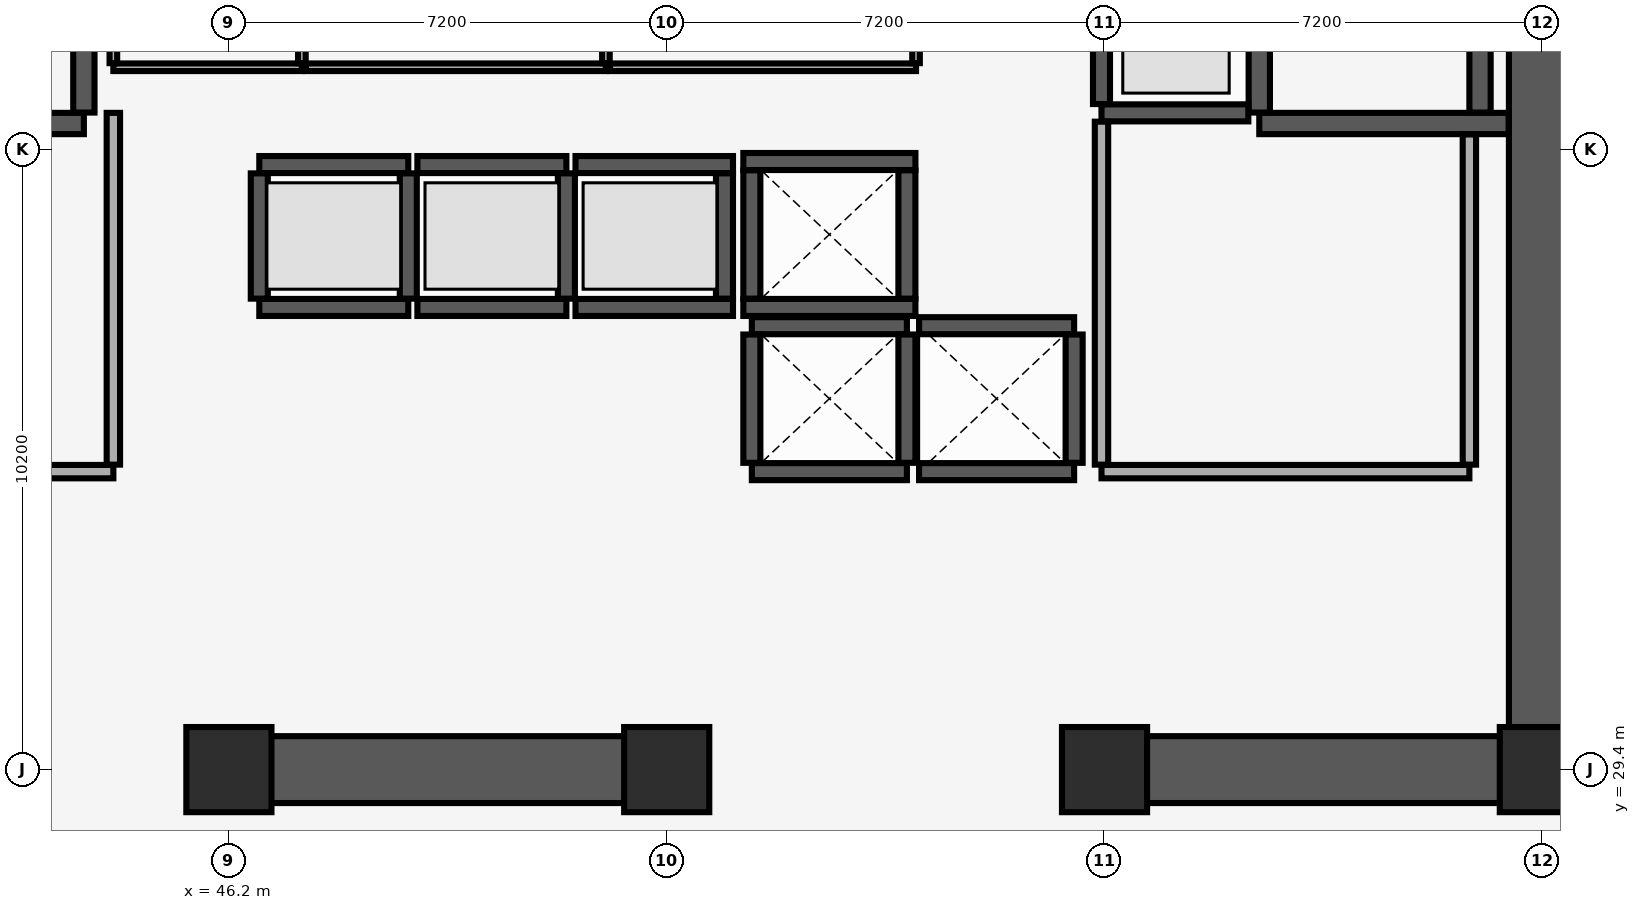
"""IFC4 building model, lengths in metres.
Left out: names, types, materials, properties, quantities, classifications, styles, units other than length and angle.
Written with IfcOpenShell. Run it as: python <this file> out.ifc"""

import sys

from ifc_helpers import new_model, si_unit, direction, frame, frame_2d, origin, origin_2d, place, context, subcontext, project, spatial, rectangle, extrude, element, fill, save


model = new_model("IFC4")
c1 = context("Model", 3, precision=1e-05, world=origin(), true_north=direction((0.0, 1.0)))
c2 = subcontext(c1, "Body", "Model", "MODEL_VIEW")
j1 = project(units=[si_unit("LENGTHUNIT", "METRE"), si_unit("PLANEANGLEUNIT", "RADIAN")], contexts=[c1])
p1 = place(None, origin())
s1 = spatial("IfcSite", under=j1, at=p1, CompositionType="ELEMENT")
p2 = place(p1, origin())
s2 = spatial("IfcBuilding", under=s1, at=p2, CompositionType="ELEMENT")
p3 = place(p2, frame((0.0, 0.0, 8.0)))
s3 = spatial("IfcBuildingStorey", under=s2, at=p3, CompositionType="ELEMENT", Elevation=8.0)
for number, where, z_axis, x_axis in (
    (1, (46.2, 29.4, 0.0), (0.0, 0.0, 1.0), (1.0, 0.0, 0.0)),
    (2, (53.4, 29.4, 0.0), (0.0, 0.0, 1.0), (1.0, 0.0, 0.0)),
    (3, (60.6, 29.4, 0.0), (0.0, 0.0, 1.0), (1.0, 0.0, 0.0)),
    (4, (67.8, 29.4, 0.0), (0.0, 0.0, 1.0), (1.0, 0.0, 0.0)),
):
    element("IfcColumn", number, at=place(p3, frame(where, z_axis=z_axis, x_axis=x_axis)), inside=s3, PredefinedType="COLUMN", context=c2, shape_type="SweptSolid", body=[
        extrude(rectangle(XDim=1.4, YDim=1.4, at=origin_2d()), origin(), (0.0, 0.0, 1.0), 5.68),
    ])
p4 = place(p3, frame((67.8, 29.4, 0.0), z_axis=(0.0, 0.0, 1.0), x_axis=(0.0, 1.0, 0.0)))
e5 = element("IfcWall", 5, at=p4, inside=s3, PredefinedType="SHEAR", context=c2, shape_type="SweptSolid", body=[
    extrude(rectangle(XDim=19.2, YDim=1.1, at=frame_2d((9.6, 0.0))), origin(), (0.0, 0.0, 1.0), 5.68),
])
p5 = place(p3, frame((46.0, 29.4, 0.0), z_axis=(0.0, 0.0, 1.0), x_axis=(1.0, 0.0, 0.0)))
e6 = element("IfcWall", 6, at=p5, inside=s3, PredefinedType="SHEAR", context=c2, shape_type="SweptSolid", body=[
    extrude(rectangle(XDim=7.6, YDim=1.1, at=frame_2d((3.8, 0.0))), origin(), (0.0, 0.0, 1.0), 5.68),
])
p6 = place(p3, frame((60.4, 29.4, 0.0), z_axis=(0.0, 0.0, 1.0), x_axis=(1.0, 0.0, 0.0)))
e7 = element("IfcWall", 7, at=p6, inside=s3, PredefinedType="SHEAR", context=c2, shape_type="SweptSolid", body=[
    extrude(rectangle(XDim=6.845, YDim=1.1, at=frame_2d((3.423, 0.0))), origin(), (0.0, 0.0, 1.0), 5.68),
])
p7 = place(p3, frame((40.185, 40.025, 0.0), z_axis=(0.0, 0.0, 1.0), x_axis=(1.0, 0.0, 0.0)))
e8 = element("IfcWall", 8, at=p7, inside=s3, PredefinedType="SHEAR", context=c2, shape_type="SweptSolid", body=[
    extrude(rectangle(XDim=3.63, YDim=0.35, at=frame_2d((1.815, 0.0))), origin(), (0.0, 0.0, 1.0), 5.68),
])
p8 = place(p7, frame((1.24, 0.0, 0.0)))
e9 = element("IfcOpeningElement", 9, at=p8, cuts=e8, PredefinedType="OPENING", context=c2, shape_type="SweptSolid", body=[
    extrude(rectangle(XDim=1.15, YDim=2.15, at=frame_2d((0.575, 1.075))), frame((0.0, 0.185, 0.0), z_axis=(0.0, -1.0, 0.0), x_axis=(1.0, 0.0, 0.0)), (0.0, 0.0, 1.0), 0.37),
])
p9 = place(p3, frame((43.815, 40.205, 0.0), z_axis=(0.0, 0.0, 1.0), x_axis=(0.0, 1.0, 0.0)))
e10 = element("IfcWall", 10, at=p9, inside=s3, PredefinedType="SHEAR", context=c2, shape_type="SweptSolid", body=[
    extrude(rectangle(XDim=8.09, YDim=0.35, at=frame_2d((4.045, 0.0))), origin(), (0.0, 0.0, 1.0), 5.68),
])
p10 = place(p3, frame((63.145, 40.025, 0.0), z_axis=(0.0, 0.0, 1.0), x_axis=(1.0, 0.0, 0.0)))
e11 = element("IfcWall", 11, at=p10, inside=s3, PredefinedType="SHEAR", context=c2, shape_type="SweptSolid", body=[
    extrude(rectangle(XDim=4.1, YDim=0.35, at=frame_2d((2.05, 0.0))), origin(), (0.0, 0.0, 1.0), 5.68),
])
p11 = place(p10, frame((1.24, 0.0, 0.0)))
e12 = element("IfcOpeningElement", 12, at=p11, cuts=e11, PredefinedType="OPENING", context=c2, shape_type="SweptSolid", body=[
    extrude(rectangle(XDim=1.15, YDim=2.15, at=frame_2d((0.575, 1.075))), frame((0.0, 0.185, 0.0), z_axis=(0.0, -1.0, 0.0), x_axis=(1.0, 0.0, 0.0)), (0.0, 0.0, 1.0), 0.37),
])
for number, where, z_axis, x_axis in (
    (13, (63.145, 40.205, 0.0), (0.0, 0.0, 1.0), (0.0, 1.0, 0.0)),
    (14, (66.775, 40.205, 0.0), (0.0, 0.0, 1.0), (0.0, 1.0, 0.0)),
):
    element("IfcWall", number, at=place(p3, frame(where, z_axis=z_axis, x_axis=x_axis)), inside=s3, PredefinedType="SHEAR", context=c2, shape_type="SweptSolid", body=[
        extrude(rectangle(XDim=8.09, YDim=0.35, at=frame_2d((4.045, 0.0))), origin(), (0.0, 0.0, 1.0), 5.68),
    ])
p12 = place(p3, frame((46.7, 37.0, 0.0), z_axis=(0.0, 0.0, 1.0), x_axis=(1.0, 0.0, 0.0)))
e15 = element("IfcWall", 15, at=p12, inside=s3, PredefinedType="SHEAR", context=c2, shape_type="SweptSolid", body=[
    extrude(rectangle(XDim=2.45, YDim=0.28, at=frame_2d((1.225, 0.0))), origin(), (0.0, 0.0, 1.0), 5.68),
])
p13 = place(p3, frame((46.7, 39.35, 0.0), z_axis=(0.0, 0.0, 1.0), x_axis=(1.0, 0.0, 0.0)))
e16 = element("IfcWall", 16, at=p13, inside=s3, PredefinedType="SHEAR", context=c2, shape_type="SweptSolid", body=[
    extrude(rectangle(XDim=2.45, YDim=0.28, at=frame_2d((1.225, 0.0))), origin(), (0.0, 0.0, 1.0), 5.68),
])
p14 = place(p13, frame((0.625, 0.0, 0.0)))
e17 = element("IfcOpeningElement", 17, at=p14, cuts=e16, PredefinedType="OPENING", context=c2, shape_type="SweptSolid", body=[
    extrude(rectangle(XDim=1.2, YDim=2.25, at=frame_2d((0.6, 1.125))), frame((0.0, 0.15, 0.0), z_axis=(0.0, -1.0, 0.0), x_axis=(1.0, 0.0, 0.0)), (0.0, 0.0, 1.0), 0.3),
])
for number, where, z_axis, x_axis in (
    (18, (46.7, 37.145, 0.0), (0.0, 0.0, 1.0), (0.0, 1.0, 0.0)),
    (19, (49.15, 37.145, 0.0), (0.0, 0.0, 1.0), (0.0, 1.0, 0.0)),
):
    element("IfcWall", number, at=place(p3, frame(where, z_axis=z_axis, x_axis=x_axis)), inside=s3, PredefinedType="SHEAR", context=c2, shape_type="SweptSolid", body=[
        extrude(rectangle(XDim=2.06, YDim=0.28, at=frame_2d((1.03, 0.0))), origin(), (0.0, 0.0, 1.0), 5.68),
    ])
p15 = place(p3, frame((49.3, 37.0, 0.0), z_axis=(0.0, 0.0, 1.0), x_axis=(1.0, 0.0, 0.0)))
e20 = element("IfcWall", 20, at=p15, inside=s3, PredefinedType="SHEAR", context=c2, shape_type="SweptSolid", body=[
    extrude(rectangle(XDim=2.45, YDim=0.28, at=frame_2d((1.225, 0.0))), origin(), (0.0, 0.0, 1.0), 5.68),
])
p16 = place(p3, frame((49.3, 39.35, 0.0), z_axis=(0.0, 0.0, 1.0), x_axis=(1.0, 0.0, 0.0)))
e21 = element("IfcWall", 21, at=p16, inside=s3, PredefinedType="SHEAR", context=c2, shape_type="SweptSolid", body=[
    extrude(rectangle(XDim=2.45, YDim=0.28, at=frame_2d((1.225, 0.0))), origin(), (0.0, 0.0, 1.0), 5.68),
])
p17 = place(p16, frame((0.625, 0.0, 0.0)))
e22 = element("IfcOpeningElement", 22, at=p17, cuts=e21, PredefinedType="OPENING", context=c2, shape_type="SweptSolid", body=[
    extrude(rectangle(XDim=1.2, YDim=2.25, at=frame_2d((0.6, 1.125))), frame((0.0, 0.15, 0.0), z_axis=(0.0, -1.0, 0.0), x_axis=(1.0, 0.0, 0.0)), (0.0, 0.0, 1.0), 0.3),
])
p18 = place(p3, frame((51.75, 37.145, 0.0), z_axis=(0.0, 0.0, 1.0), x_axis=(0.0, 1.0, 0.0)))
e23 = element("IfcWall", 23, at=p18, inside=s3, PredefinedType="SHEAR", context=c2, shape_type="SweptSolid", body=[
    extrude(rectangle(XDim=2.06, YDim=0.28, at=frame_2d((1.03, 0.0))), origin(), (0.0, 0.0, 1.0), 5.68),
])
p19 = place(p3, frame((51.9, 37.0, 0.0), z_axis=(0.0, 0.0, 1.0), x_axis=(1.0, 0.0, 0.0)))
e24 = element("IfcWall", 24, at=p19, inside=s3, PredefinedType="SHEAR", context=c2, shape_type="SweptSolid", body=[
    extrude(rectangle(XDim=2.59, YDim=0.28, at=frame_2d((1.295, 0.0))), origin(), (0.0, 0.0, 1.0), 5.68),
])
p20 = place(p3, frame((51.9, 39.35, 0.0), z_axis=(0.0, 0.0, 1.0), x_axis=(1.0, 0.0, 0.0)))
e25 = element("IfcWall", 25, at=p20, inside=s3, PredefinedType="SHEAR", context=c2, shape_type="SweptSolid", body=[
    extrude(rectangle(XDim=2.59, YDim=0.28, at=frame_2d((1.295, 0.0))), origin(), (0.0, 0.0, 1.0), 5.68),
])
p21 = place(p20, frame((0.625, 0.0, 0.0)))
e26 = element("IfcOpeningElement", 26, at=p21, cuts=e25, PredefinedType="OPENING", context=c2, shape_type="SweptSolid", body=[
    extrude(rectangle(XDim=1.2, YDim=2.25, at=frame_2d((0.6, 1.125))), frame((0.0, 0.15, 0.0), z_axis=(0.0, -1.0, 0.0), x_axis=(1.0, 0.0, 0.0)), (0.0, 0.0, 1.0), 0.3),
])
p22 = place(p3, frame((54.35, 37.145, 0.0), z_axis=(0.0, 0.0, 1.0), x_axis=(0.0, 1.0, 0.0)))
e27 = element("IfcWall", 27, at=p22, inside=s3, PredefinedType="SHEAR", context=c2, shape_type="SweptSolid", body=[
    extrude(rectangle(XDim=2.06, YDim=0.28, at=frame_2d((1.03, 0.0))), origin(), (0.0, 0.0, 1.0), 5.68),
])
for number, where, z_axis, x_axis in (
    (28, (54.8, 34.3, 0.0), (0.0, 0.0, 1.0), (1.0, 0.0, 0.0)),
    (29, (54.8, 36.7, 0.0), (0.0, 0.0, 1.0), (1.0, 0.0, 0.0)),
):
    element("IfcWall", number, at=place(p3, frame(where, z_axis=z_axis, x_axis=x_axis)), inside=s3, PredefinedType="SHEAR", context=c2, shape_type="SweptSolid", body=[
        extrude(rectangle(XDim=2.55, YDim=0.28, at=frame_2d((1.275, 0.0))), origin(), (0.0, 0.0, 1.0), 5.68),
    ])
for number, where, z_axis, x_axis in (
    (30, (54.8, 34.445, 0.0), (0.0, 0.0, 1.0), (0.0, 1.0, 0.0)),
    (31, (57.35, 34.445, 0.0), (0.0, 0.0, 1.0), (0.0, 1.0, 0.0)),
):
    element("IfcWall", number, at=place(p3, frame(where, z_axis=z_axis, x_axis=x_axis)), inside=s3, PredefinedType="SHEAR", context=c2, shape_type="SweptSolid", body=[
        extrude(rectangle(XDim=2.11, YDim=0.28, at=frame_2d((1.055, 0.0))), origin(), (0.0, 0.0, 1.0), 5.68),
    ])
for number, where, z_axis, x_axis in (
    (32, (57.55, 34.3, 0.0), (0.0, 0.0, 1.0), (1.0, 0.0, 0.0)),
    (33, (57.55, 36.7, 0.0), (0.0, 0.0, 1.0), (1.0, 0.0, 0.0)),
):
    element("IfcWall", number, at=place(p3, frame(where, z_axis=z_axis, x_axis=x_axis)), inside=s3, PredefinedType="SHEAR", context=c2, shape_type="SweptSolid", body=[
        extrude(rectangle(XDim=2.55, YDim=0.28, at=frame_2d((1.275, 0.0))), origin(), (0.0, 0.0, 1.0), 5.68),
    ])
p23 = place(p3, frame((60.1, 34.445, 0.0), z_axis=(0.0, 0.0, 1.0), x_axis=(0.0, 1.0, 0.0)))
e34 = element("IfcWall", 34, at=p23, inside=s3, PredefinedType="SHEAR", context=c2, shape_type="SweptSolid", body=[
    extrude(rectangle(XDim=2.11, YDim=0.28, at=frame_2d((1.055, 0.0))), origin(), (0.0, 0.0, 1.0), 5.68),
])
for number, where, z_axis, x_axis in (
    (35, (54.66, 37.0, 0.0), (0.0, 0.0, 1.0), (1.0, 0.0, 0.0)),
    (36, (54.66, 39.4, 0.0), (0.0, 0.0, 1.0), (1.0, 0.0, 0.0)),
):
    element("IfcWall", number, at=place(p3, frame(where, z_axis=z_axis, x_axis=x_axis)), inside=s3, PredefinedType="SHEAR", context=c2, shape_type="SweptSolid", body=[
        extrude(rectangle(XDim=2.83, YDim=0.28, at=frame_2d((1.415, 0.0))), origin(), (0.0, 0.0, 1.0), 5.68),
    ])
for number, where, z_axis, x_axis in (
    (37, (54.8, 37.145, 0.0), (0.0, 0.0, 1.0), (0.0, 1.0, 0.0)),
    (38, (57.35, 37.145, 0.0), (0.0, 0.0, 1.0), (0.0, 1.0, 0.0)),
):
    element("IfcWall", number, at=place(p3, frame(where, z_axis=z_axis, x_axis=x_axis)), inside=s3, PredefinedType="SHEAR", context=c2, shape_type="SweptSolid", body=[
        extrude(rectangle(XDim=2.11, YDim=0.28, at=frame_2d((1.055, 0.0))), origin(), (0.0, 0.0, 1.0), 5.68),
    ])
p24 = place(p3, frame((60.55, 40.2, 0.0), z_axis=(0.0, 0.0, 1.0), x_axis=(1.0, 0.0, 0.0)))
e39 = element("IfcWall", 39, at=p24, inside=s3, PredefinedType="SHEAR", context=c2, shape_type="SweptSolid", body=[
    extrude(rectangle(XDim=2.415, YDim=0.28, at=frame_2d((1.208, 0.0))), origin(), (0.0, 0.0, 1.0), 5.68),
])
p25 = place(p24, frame((0.575, 0.0, 0.0)))
e40 = element("IfcOpeningElement", 40, at=p25, cuts=e39, PredefinedType="OPENING", context=c2, shape_type="SweptSolid", body=[
    extrude(rectangle(XDim=1.3, YDim=2.3, at=frame_2d((0.65, 1.15))), frame((0.0, 0.15, 0.0), z_axis=(0.0, -1.0, 0.0), x_axis=(1.0, 0.0, 0.0)), (0.0, 0.0, 1.0), 0.3),
])
p26 = place(p3, frame((60.55, 40.345, 0.0), z_axis=(0.0, 0.0, 1.0), x_axis=(0.0, 1.0, 0.0)))
e41 = element("IfcWall", 41, at=p26, inside=s3, PredefinedType="SHEAR", context=c2, shape_type="SweptSolid", body=[
    extrude(rectangle(XDim=2.81, YDim=0.28, at=frame_2d((1.405, 0.0))), origin(), (0.0, 0.0, 1.0), 5.68),
])
p27 = place(p3, frame((60.55, 34.3, 0.0), z_axis=(0.0, 0.0, 1.0), x_axis=(1.0, 0.0, 0.0)))
e42 = element("IfcWall", 42, at=p27, inside=s3, PredefinedType="PARTITIONING", context=c2, shape_type="SweptSolid", body=[
    extrude(rectangle(XDim=6.05, YDim=0.22, at=frame_2d((3.025, 0.0))), origin(), (0.0, 0.0, 1.0), 5.68),
])
p28 = place(p27, frame((2.65, 0.0, 0.0)))
e43 = element("IfcOpeningElement", 43, at=p28, cuts=e42, PredefinedType="OPENING", context=c2, shape_type="SweptSolid", body=[
    extrude(rectangle(XDim=1.2, YDim=2.15, at=frame_2d((0.6, 1.075))), frame((0.0, 0.12, 0.0), z_axis=(0.0, -1.0, 0.0), x_axis=(1.0, 0.0, 0.0)), (0.0, 0.0, 1.0), 0.24),
])
p29 = place(p3, frame((60.55, 34.415, 0.0), z_axis=(0.0, 0.0, 1.0), x_axis=(0.0, 1.0, 0.0)))
e44 = element("IfcWall", 44, at=p29, inside=s3, PredefinedType="PARTITIONING", context=c2, shape_type="SweptSolid", body=[
    extrude(rectangle(XDim=5.64, YDim=0.22, at=frame_2d((2.82, 0.0))), origin(), (0.0, 0.0, 1.0), 5.68),
])
p30 = place(p3, frame((66.6, 34.415, 0.0), z_axis=(0.0, 0.0, 1.0), x_axis=(0.0, 1.0, 0.0)))
e45 = element("IfcWall", 45, at=p30, inside=s3, PredefinedType="PARTITIONING", context=c2, shape_type="SweptSolid", body=[
    extrude(rectangle(XDim=5.43, YDim=0.22, at=frame_2d((2.715, 0.0))), origin(), (0.0, 0.0, 1.0), 5.68),
])
p31 = place(p3, frame((39.7, 34.3, 0.0), z_axis=(0.0, 0.0, 1.0), x_axis=(1.0, 0.0, 0.0)))
e46 = element("IfcWall", 46, at=p31, inside=s3, PredefinedType="PARTITIONING", context=c2, shape_type="SweptSolid", body=[
    extrude(rectangle(XDim=4.6, YDim=0.22, at=frame_2d((2.3, 0.0))), origin(), (0.0, 0.0, 1.0), 5.68),
])
p32 = place(p31, frame((1.7, 0.0, 0.0)))
e47 = element("IfcOpeningElement", 47, at=p32, cuts=e46, PredefinedType="OPENING", context=c2, shape_type="SweptSolid", body=[
    extrude(rectangle(XDim=1.2, YDim=2.15, at=frame_2d((0.6, 1.075))), frame((0.0, 0.12, 0.0), z_axis=(0.0, -1.0, 0.0), x_axis=(1.0, 0.0, 0.0)), (0.0, 0.0, 1.0), 0.24),
])
p33 = place(p3, frame((44.3, 34.415, 0.0), z_axis=(0.0, 0.0, 1.0), x_axis=(0.0, 1.0, 0.0)))
e48 = element("IfcWall", 48, at=p33, inside=s3, PredefinedType="PARTITIONING", context=c2, shape_type="SweptSolid", body=[
    extrude(rectangle(XDim=5.785, YDim=0.22, at=frame_2d((2.893, 0.0))), origin(), (0.0, 0.0, 1.0), 5.68),
])
p34 = place(p3, frame((44.3, 40.95, 0.0), z_axis=(0.0, 0.0, 1.0), x_axis=(1.0, 0.0, 0.0)))
e49 = element("IfcWall", 49, at=p34, inside=s3, PredefinedType="PARTITIONING", context=c2, shape_type="SweptSolid", body=[
    extrude(rectangle(XDim=3.1, YDim=0.125, at=frame_2d((1.55, 0.0))), origin(), (0.0, 0.0, 1.0), 5.68),
])
p35 = place(p34, frame((1.1, 0.0, 0.0)))
e50 = element("IfcOpeningElement", 50, at=p35, cuts=e49, PredefinedType="OPENING", context=c2, shape_type="SweptSolid", body=[
    extrude(rectangle(XDim=0.9, YDim=2.1, at=frame_2d((0.45, 1.05))), frame((0.0, 0.073, 0.0), z_axis=(0.0, -1.0, 0.0), x_axis=(1.0, 0.0, 0.0)), (0.0, 0.0, 1.0), 0.145),
])
for number, where, z_axis, x_axis in (
    (51, (44.3, 41.018, 0.0), (0.0, 0.0, 1.0), (0.0, 1.0, 0.0)),
    (52, (47.4, 41.018, 0.0), (0.0, 0.0, 1.0), (0.0, 1.0, 0.0)),
):
    element("IfcWall", number, at=place(p3, frame(where, z_axis=z_axis, x_axis=x_axis)), inside=s3, PredefinedType="PARTITIONING", context=c2, shape_type="SweptSolid", body=[
        extrude(rectangle(XDim=7.215, YDim=0.125, at=frame_2d((3.607, 0.0))), origin(), (0.0, 0.0, 1.0), 5.68),
    ])
p36 = place(p3, frame((47.468, 40.95, 0.0), z_axis=(0.0, 0.0, 1.0), x_axis=(1.0, 0.0, 0.0)))
e53 = element("IfcWall", 53, at=p36, inside=s3, PredefinedType="PARTITIONING", context=c2, shape_type="SweptSolid", body=[
    extrude(rectangle(XDim=4.932, YDim=0.125, at=frame_2d((2.466, 0.0))), origin(), (0.0, 0.0, 1.0), 5.68),
])
p37 = place(p36, frame((1.982, 0.0, 0.0)))
e54 = element("IfcOpeningElement", 54, at=p37, cuts=e53, PredefinedType="OPENING", context=c2, shape_type="SweptSolid", body=[
    extrude(rectangle(XDim=0.9, YDim=2.1, at=frame_2d((0.45, 1.05))), frame((0.0, 0.073, 0.0), z_axis=(0.0, -1.0, 0.0), x_axis=(1.0, 0.0, 0.0)), (0.0, 0.0, 1.0), 0.145),
])
p38 = place(p3, frame((52.4, 41.018, 0.0), z_axis=(0.0, 0.0, 1.0), x_axis=(0.0, 1.0, 0.0)))
e55 = element("IfcWall", 55, at=p38, inside=s3, PredefinedType="PARTITIONING", context=c2, shape_type="SweptSolid", body=[
    extrude(rectangle(XDim=7.215, YDim=0.125, at=frame_2d((3.607, 0.0))), origin(), (0.0, 0.0, 1.0), 5.68),
])
p39 = place(p3, frame((52.468, 40.95, 0.0), z_axis=(0.0, 0.0, 1.0), x_axis=(1.0, 0.0, 0.0)))
e56 = element("IfcWall", 56, at=p39, inside=s3, PredefinedType="PARTITIONING", context=c2, shape_type="SweptSolid", body=[
    extrude(rectangle(XDim=5.032, YDim=0.125, at=frame_2d((2.516, 0.0))), origin(), (0.0, 0.0, 1.0), 5.68),
])
p40 = place(p39, frame((2.032, 0.0, 0.0)))
e57 = element("IfcOpeningElement", 57, at=p40, cuts=e56, PredefinedType="OPENING", context=c2, shape_type="SweptSolid", body=[
    extrude(rectangle(XDim=0.9, YDim=2.1, at=frame_2d((0.45, 1.05))), frame((0.0, 0.073, 0.0), z_axis=(0.0, -1.0, 0.0), x_axis=(1.0, 0.0, 0.0)), (0.0, 0.0, 1.0), 0.145),
])
p41 = place(p3, frame((57.5, 41.018, 0.0), z_axis=(0.0, 0.0, 1.0), x_axis=(0.0, 1.0, 0.0)))
e58 = element("IfcWall", 58, at=p41, inside=s3, PredefinedType="PARTITIONING", context=c2, shape_type="SweptSolid", body=[
    extrude(rectangle(XDim=2.167, YDim=0.125, at=frame_2d((1.084, 0.0))), origin(), (0.0, 0.0, 1.0), 5.68),
])
p42 = place(p11, origin())
e59 = element("IfcDoor", 59, at=p42, inside=s3, OperationType="SINGLE_SWING_LEFT", PredefinedType="DOOR", context=c2, shape_type="SweptSolid", body=[
    extrude(rectangle(XDim=1.15, YDim=2.15, at=frame_2d((0.575, 1.075))), frame((0.0, 0.025, 0.0), z_axis=(0.0, -1.0, 0.0), x_axis=(1.0, 0.0, 0.0)), (0.0, 0.0, 1.0), 0.05),
])
fill(e12, e59)
p43 = place(p14, origin())
e60 = element("IfcDoor", 60, at=p43, inside=s3, OperationType="DOUBLE_DOOR_SLIDING", PredefinedType="DOOR", context=c2, shape_type="SweptSolid", body=[
    extrude(rectangle(XDim=1.2, YDim=2.25, at=frame_2d((0.6, 1.125))), frame((0.0, 0.025, 0.0), z_axis=(0.0, -1.0, 0.0), x_axis=(1.0, 0.0, 0.0)), (0.0, 0.0, 1.0), 0.05),
])
fill(e17, e60)
p44 = place(p17, origin())
e61 = element("IfcDoor", 61, at=p44, inside=s3, OperationType="DOUBLE_DOOR_SLIDING", PredefinedType="DOOR", context=c2, shape_type="SweptSolid", body=[
    extrude(rectangle(XDim=1.2, YDim=2.25, at=frame_2d((0.6, 1.125))), frame((0.0, 0.025, 0.0), z_axis=(0.0, -1.0, 0.0), x_axis=(1.0, 0.0, 0.0)), (0.0, 0.0, 1.0), 0.05),
])
fill(e22, e61)
p45 = place(p21, origin())
e62 = element("IfcDoor", 62, at=p45, inside=s3, OperationType="DOUBLE_DOOR_SLIDING", PredefinedType="DOOR", context=c2, shape_type="SweptSolid", body=[
    extrude(rectangle(XDim=1.2, YDim=2.25, at=frame_2d((0.6, 1.125))), frame((0.0, 0.025, 0.0), z_axis=(0.0, -1.0, 0.0), x_axis=(1.0, 0.0, 0.0)), (0.0, 0.0, 1.0), 0.05),
])
fill(e26, e62)
p46 = place(p25, origin())
e63 = element("IfcDoor", 63, at=p46, inside=s3, OperationType="DOUBLE_DOOR_SLIDING", PredefinedType="DOOR", context=c2, shape_type="SweptSolid", body=[
    extrude(rectangle(XDim=1.3, YDim=2.3, at=frame_2d((0.65, 1.15))), frame((0.0, 0.025, 0.0), z_axis=(0.0, -1.0, 0.0), x_axis=(1.0, 0.0, 0.0)), (0.0, 0.0, 1.0), 0.05),
])
fill(e40, e63)
p47 = place(p28, origin())
e64 = element("IfcDoor", 64, at=p47, inside=s3, OperationType="SINGLE_SWING_RIGHT", PredefinedType="DOOR", context=c2, shape_type="SweptSolid", body=[
    extrude(rectangle(XDim=1.2, YDim=2.15, at=frame_2d((0.6, 1.075))), frame((0.0, 0.025, 0.0), z_axis=(0.0, -1.0, 0.0), x_axis=(1.0, 0.0, 0.0)), (0.0, 0.0, 1.0), 0.05),
])
fill(e43, e64)
p48 = place(p35, origin())
e65 = element("IfcDoor", 65, at=p48, inside=s3, OperationType="SINGLE_SWING_RIGHT", PredefinedType="DOOR", context=c2, shape_type="SweptSolid", body=[
    extrude(rectangle(XDim=0.9, YDim=2.1, at=frame_2d((0.45, 1.05))), frame((0.0, 0.025, 0.0), z_axis=(0.0, -1.0, 0.0), x_axis=(1.0, 0.0, 0.0)), (0.0, 0.0, 1.0), 0.05),
])
fill(e50, e65)
p49 = place(p37, origin())
e66 = element("IfcDoor", 66, at=p49, inside=s3, OperationType="SINGLE_SWING_LEFT", PredefinedType="DOOR", context=c2, shape_type="SweptSolid", body=[
    extrude(rectangle(XDim=0.9, YDim=2.1, at=frame_2d((0.45, 1.05))), frame((0.0, 0.025, 0.0), z_axis=(0.0, -1.0, 0.0), x_axis=(1.0, 0.0, 0.0)), (0.0, 0.0, 1.0), 0.05),
])
fill(e54, e66)
p50 = place(p40, origin())
e67 = element("IfcDoor", 67, at=p50, inside=s3, OperationType="SINGLE_SWING_RIGHT", PredefinedType="DOOR", context=c2, shape_type="SweptSolid", body=[
    extrude(rectangle(XDim=0.9, YDim=2.1, at=frame_2d((0.45, 1.05))), frame((0.0, 0.025, 0.0), z_axis=(0.0, -1.0, 0.0), x_axis=(1.0, 0.0, 0.0)), (0.0, 0.0, 1.0), 0.05),
])
fill(e57, e67)
save(model, sys.argv[1])
